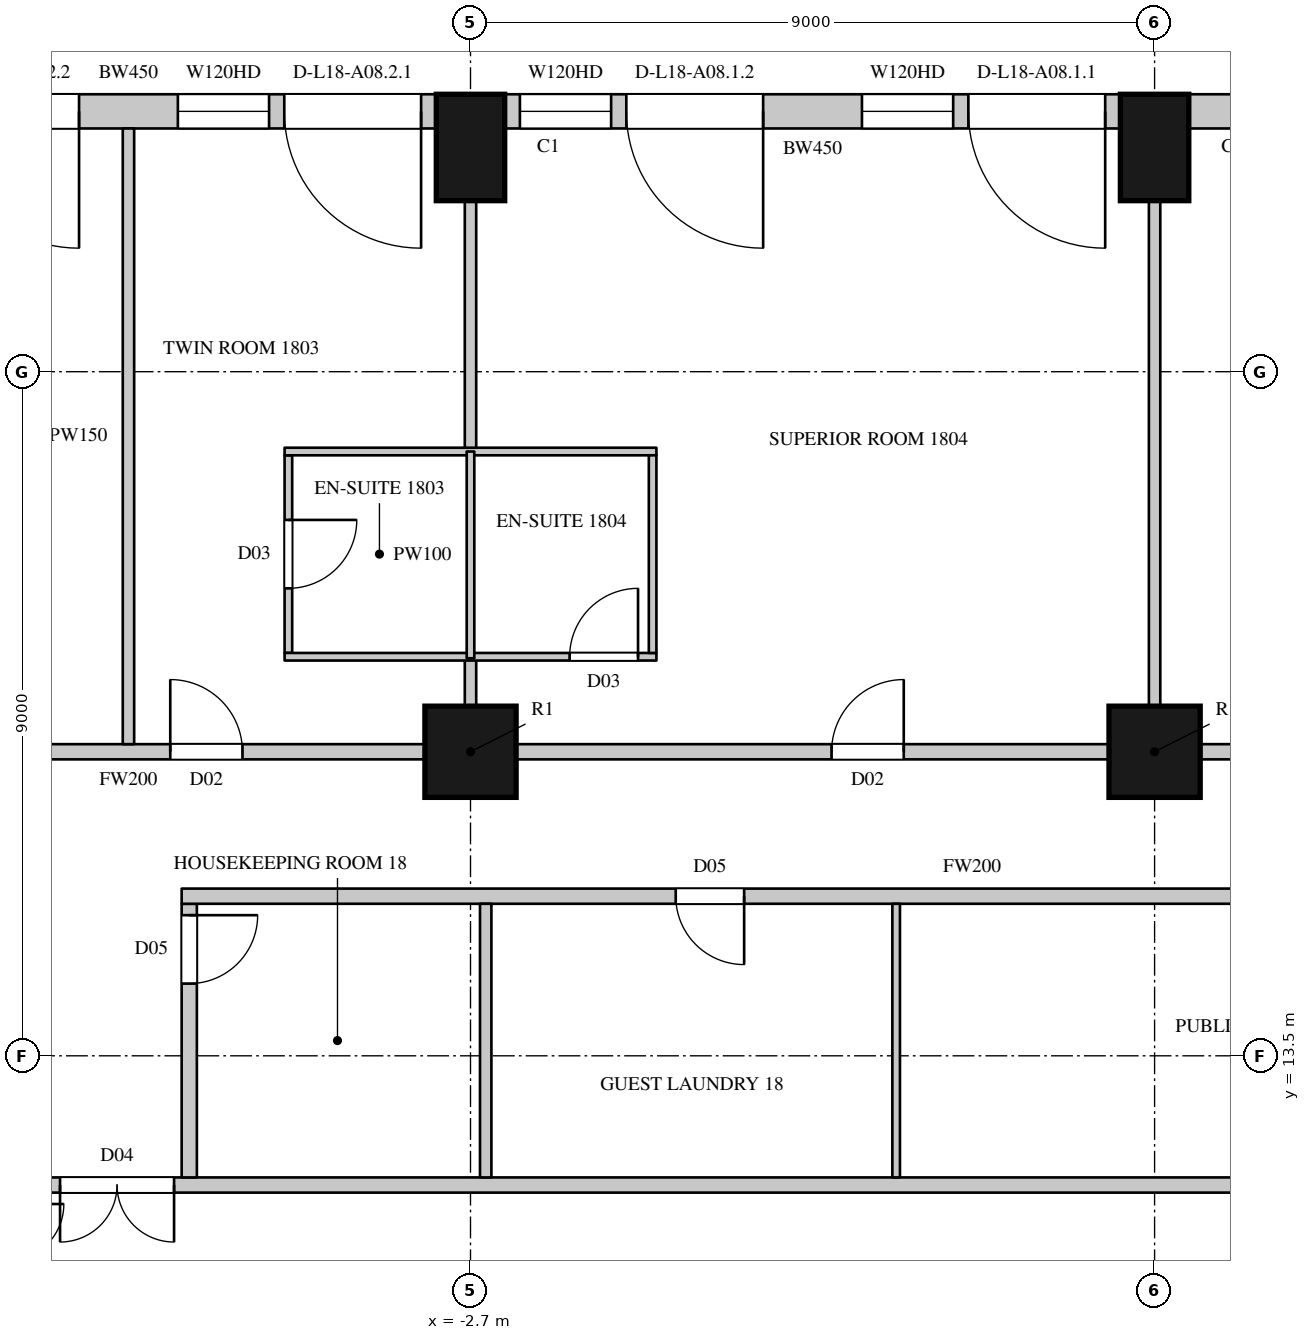
"""IFC4 building model, lengths in metres.
Left out: names, types, materials, properties, quantities, classifications, styles, units other than length and angle.
Written with IfcOpenShell. Run it as: python <this file> out.ifc"""

import sys

from ifc_helpers import new_model, si_unit, direction, frame, frame_2d, origin, origin_2d, place, context, subcontext, project, spatial, rectangle, circle, extrude, element, fill, save


model = new_model("IFC4")
c1 = context("Model", 3, precision=1e-05, world=origin(), true_north=direction((0.0, 1.0)))
c2 = subcontext(c1, "Body", "Model", "MODEL_VIEW")
j1 = project(units=[si_unit("LENGTHUNIT", "METRE"), si_unit("PLANEANGLEUNIT", "RADIAN")], contexts=[c1])
p1 = place(None, origin())
s1 = spatial("IfcSite", under=j1, at=p1, CompositionType="ELEMENT")
p2 = place(p1, origin())
s2 = spatial("IfcBuilding", under=s1, at=p2, CompositionType="ELEMENT")
p3 = place(p2, frame((0.0, 0.0, 95.1)))
s3 = spatial("IfcBuildingStorey", under=s2, at=p3, CompositionType="ELEMENT", Elevation=95.1)
for number, where, z_axis, x_axis in (
    (1, (6.3, 25.45, 0.0), (0.0, 0.0, 1.0), (-1.0, 0.0, 0.0)),
    (2, (-2.7, 25.45, 0.0), (0.0, 0.0, 1.0), (-1.0, 0.0, 0.0)),
):
    element("IfcColumn", number, at=place(p3, frame(where, z_axis=z_axis, x_axis=x_axis)), inside=s3, PredefinedType="COLUMN", context=c2, shape_type="SweptSolid", body=[
        extrude(rectangle(XDim=0.9, YDim=1.4, at=origin_2d()), origin(), (0.0, 0.0, 1.0), 3.6),
    ])
for number, where, z_axis, x_axis in (
    (3, (-2.7, 17.5, 0.0), (0.0, 0.0, 1.0), (1.0, 0.0, 0.0)),
    (4, (6.3, 17.5, 0.0), (0.0, 0.0, 1.0), (1.0, 0.0, 0.0)),
):
    element("IfcColumn", number, at=place(p3, frame(where, z_axis=z_axis, x_axis=x_axis)), inside=s3, PredefinedType="COLUMN", context=c2, shape_type="SweptSolid", body=[
        extrude(circle(Radius=0.6, at=origin_2d()), origin(), (0.0, 0.0, 1.0), 3.6),
    ])
p4 = place(p3, frame((11.989, 25.925, 0.0), z_axis=(0.0, 0.0, 1.0), x_axis=(-1.0, 0.0, 0.0)))
e5 = element("IfcWall", 5, at=p4, inside=s3, PredefinedType="SOLIDWALL", context=c2, shape_type="SweptSolid", body=[
    extrude(rectangle(XDim=5.239, YDim=0.45, at=frame_2d((2.619, 0.0))), origin(), (0.0, 0.0, 1.0), 3.3),
])
p5 = place(p4, frame((1.77, 0.0, 1.05)))
e6 = element("IfcOpeningElement", 6, at=p5, cuts=e5, PredefinedType="OPENING", context=c2, shape_type="SweptSolid", body=[
    extrude(rectangle(XDim=2.1, YDim=2.0, at=frame_2d((1.05, 1.0))), frame((0.0, 0.235, 0.0), z_axis=(0.0, -1.0, 0.0), x_axis=(1.0, 0.0, 0.0)), (0.0, 0.0, 1.0), 0.47),
])
p6 = place(p3, frame((5.85, 25.925, 0.0), z_axis=(0.0, 0.0, 1.0), x_axis=(-1.0, 0.0, 0.0)))
e7 = element("IfcWall", 7, at=p6, inside=s3, PredefinedType="SOLIDWALL", context=c2, shape_type="SweptSolid", body=[
    extrude(rectangle(XDim=8.1, YDim=0.45, at=frame_2d((4.05, 0.0))), origin(), (0.0, 0.0, 1.0), 3.3),
])
p7 = place(p6, frame((0.2, 0.0, 0.0)))
e8 = element("IfcOpeningElement", 8, at=p7, cuts=e7, PredefinedType="OPENING", context=c2, shape_type="SweptSolid", body=[
    extrude(rectangle(XDim=1.8, YDim=2.4, at=frame_2d((0.9, 1.2))), frame((0.0, 0.235, 0.0), z_axis=(0.0, -1.0, 0.0), x_axis=(1.0, 0.0, 0.0)), (0.0, 0.0, 1.0), 0.47),
])
p8 = place(p6, frame((2.2, 0.0, 1.05)))
e9 = element("IfcOpeningElement", 9, at=p8, cuts=e7, PredefinedType="OPENING", context=c2, shape_type="SweptSolid", body=[
    extrude(rectangle(XDim=1.2, YDim=2.0, at=frame_2d((0.6, 1.0))), frame((0.0, 0.235, 0.0), z_axis=(0.0, -1.0, 0.0), x_axis=(1.0, 0.0, 0.0)), (0.0, 0.0, 1.0), 0.47),
])
p9 = place(p6, frame((4.7, 0.0, 0.0)))
e10 = element("IfcOpeningElement", 10, at=p9, cuts=e7, PredefinedType="OPENING", context=c2, shape_type="SweptSolid", body=[
    extrude(rectangle(XDim=1.8, YDim=2.4, at=frame_2d((0.9, 1.2))), frame((0.0, 0.235, 0.0), z_axis=(0.0, -1.0, 0.0), x_axis=(1.0, 0.0, 0.0)), (0.0, 0.0, 1.0), 0.47),
])
p10 = place(p6, frame((6.7, 0.0, 1.05)))
e11 = element("IfcOpeningElement", 11, at=p10, cuts=e7, PredefinedType="OPENING", context=c2, shape_type="SweptSolid", body=[
    extrude(rectangle(XDim=1.2, YDim=2.0, at=frame_2d((0.6, 1.0))), frame((0.0, 0.235, 0.0), z_axis=(0.0, -1.0, 0.0), x_axis=(1.0, 0.0, 0.0)), (0.0, 0.0, 1.0), 0.47),
])
p11 = place(p3, frame((-3.15, 25.925, 0.0), z_axis=(0.0, 0.0, 1.0), x_axis=(-1.0, 0.0, 0.0)))
e12 = element("IfcWall", 12, at=p11, inside=s3, PredefinedType="SOLIDWALL", context=c2, shape_type="SweptSolid", body=[
    extrude(rectangle(XDim=8.1, YDim=0.45, at=frame_2d((4.05, 0.0))), origin(), (0.0, 0.0, 1.0), 3.3),
])
p12 = place(p11, frame((0.2, 0.0, 0.0)))
e13 = element("IfcOpeningElement", 13, at=p12, cuts=e12, PredefinedType="OPENING", context=c2, shape_type="SweptSolid", body=[
    extrude(rectangle(XDim=1.8, YDim=2.4, at=frame_2d((0.9, 1.2))), frame((0.0, 0.235, 0.0), z_axis=(0.0, -1.0, 0.0), x_axis=(1.0, 0.0, 0.0)), (0.0, 0.0, 1.0), 0.47),
])
p13 = place(p11, frame((2.2, 0.0, 1.05)))
e14 = element("IfcOpeningElement", 14, at=p13, cuts=e12, PredefinedType="OPENING", context=c2, shape_type="SweptSolid", body=[
    extrude(rectangle(XDim=1.2, YDim=2.0, at=frame_2d((0.6, 1.0))), frame((0.0, 0.235, 0.0), z_axis=(0.0, -1.0, 0.0), x_axis=(1.0, 0.0, 0.0)), (0.0, 0.0, 1.0), 0.47),
])
p14 = place(p11, frame((4.7, 0.0, 0.0)))
e15 = element("IfcOpeningElement", 15, at=p14, cuts=e12, PredefinedType="OPENING", context=c2, shape_type="SweptSolid", body=[
    extrude(rectangle(XDim=1.8, YDim=2.4, at=frame_2d((0.9, 1.2))), frame((0.0, 0.235, 0.0), z_axis=(0.0, -1.0, 0.0), x_axis=(1.0, 0.0, 0.0)), (0.0, 0.0, 1.0), 0.47),
])
p15 = place(p11, frame((6.7, 0.0, 1.05)))
e16 = element("IfcOpeningElement", 16, at=p15, cuts=e12, PredefinedType="OPENING", context=c2, shape_type="SweptSolid", body=[
    extrude(rectangle(XDim=1.2, YDim=2.0, at=frame_2d((0.6, 1.0))), frame((0.0, 0.235, 0.0), z_axis=(0.0, -1.0, 0.0), x_axis=(1.0, 0.0, 0.0)), (0.0, 0.0, 1.0), 0.47),
])
p16 = place(p3, frame((-11.1, 17.5, 0.0), z_axis=(0.0, 0.0, 1.0), x_axis=(1.0, 0.0, 0.0)))
e17 = element("IfcWall", 17, at=p16, inside=s3, PredefinedType="PARTITIONING", context=c2, shape_type="SweptSolid", body=[
    extrude(rectangle(XDim=7.8, YDim=0.2, at=frame_2d((3.9, 0.0))), origin(), (0.0, 0.0, 1.0), 2.75),
])
p17 = place(p16, frame((4.45, 0.0, 0.0)))
e18 = element("IfcOpeningElement", 18, at=p17, cuts=e17, PredefinedType="OPENING", context=c2, shape_type="SweptSolid", body=[
    extrude(rectangle(XDim=0.95, YDim=2.2, at=frame_2d((0.475, 1.1))), frame((0.0, 0.11, 0.0), z_axis=(0.0, -1.0, 0.0), x_axis=(1.0, 0.0, 0.0)), (0.0, 0.0, 1.0), 0.22),
])
p18 = place(p3, frame((-2.1, 17.5, 0.0), z_axis=(0.0, 0.0, 1.0), x_axis=(1.0, 0.0, 0.0)))
e19 = element("IfcWall", 19, at=p18, inside=s3, PredefinedType="PARTITIONING", context=c2, shape_type="SweptSolid", body=[
    extrude(rectangle(XDim=7.8, YDim=0.2, at=frame_2d((3.9, 0.0))), origin(), (0.0, 0.0, 1.0), 2.75),
])
p19 = place(p18, frame((4.15, 0.0, 0.0)))
e20 = element("IfcOpeningElement", 20, at=p19, cuts=e19, PredefinedType="OPENING", context=c2, shape_type="SweptSolid", body=[
    extrude(rectangle(XDim=0.95, YDim=2.2, at=frame_2d((0.475, 1.1))), frame((0.0, 0.11, 0.0), z_axis=(0.0, -1.0, 0.0), x_axis=(1.0, 0.0, 0.0)), (0.0, 0.0, 1.0), 0.22),
])
p20 = place(p3, frame((6.9, 17.5, 0.0), z_axis=(0.0, 0.0, 1.0), x_axis=(1.0, 0.0, 0.0)))
e21 = element("IfcWall", 21, at=p20, inside=s3, PredefinedType="PARTITIONING", context=c2, shape_type="SweptSolid", body=[
    extrude(rectangle(XDim=7.8, YDim=0.2, at=frame_2d((3.9, 0.0))), origin(), (0.0, 0.0, 1.0), 2.75),
])
p21 = place(p20, frame((1.45, 0.0, 0.0)))
e22 = element("IfcOpeningElement", 22, at=p21, cuts=e21, PredefinedType="OPENING", context=c2, shape_type="SweptSolid", body=[
    extrude(rectangle(XDim=1.1, YDim=2.4, at=frame_2d((0.55, 1.2))), frame((0.0, 0.11, 0.0), z_axis=(0.0, -1.0, 0.0), x_axis=(1.0, 0.0, 0.0)), (0.0, 0.0, 1.0), 0.22),
])
p22 = place(p3, frame((-8.9, 11.8, 0.0), z_axis=(0.0, 0.0, 1.0), x_axis=(1.0, 0.0, 0.0)))
e23 = element("IfcWall", 23, at=p22, inside=s3, PredefinedType="PARTITIONING", context=c2, shape_type="SweptSolid", body=[
    extrude(rectangle(XDim=19.7, YDim=0.2, at=frame_2d((9.85, 0.0))), origin(), (0.0, 0.0, 1.0), 3.3),
])
p23 = place(p22, frame((0.8, 0.0, 0.0)))
e24 = element("IfcOpeningElement", 24, at=p23, cuts=e23, PredefinedType="OPENING", context=c2, shape_type="SweptSolid", body=[
    extrude(rectangle(XDim=1.5, YDim=2.2, at=frame_2d((0.75, 1.1))), frame((0.0, 0.11, 0.0), z_axis=(0.0, -1.0, 0.0), x_axis=(1.0, 0.0, 0.0)), (0.0, 0.0, 1.0), 0.22),
])
p24 = place(p3, frame((-6.4, 11.9, 0.0), z_axis=(0.0, 0.0, 1.0), x_axis=(0.0, 1.0, 0.0)))
e25 = element("IfcWall", 25, at=p24, inside=s3, PredefinedType="PARTITIONING", context=c2, shape_type="SweptSolid", body=[
    extrude(rectangle(XDim=3.6, YDim=0.2, at=frame_2d((1.8, 0.0))), origin(), (0.0, 0.0, 1.0), 3.3),
])
p25 = place(p24, frame((2.55, 0.0, 0.0)))
e26 = element("IfcOpeningElement", 26, at=p25, cuts=e25, PredefinedType="OPENING", context=c2, shape_type="SweptSolid", body=[
    extrude(rectangle(XDim=0.9, YDim=2.2, at=frame_2d((0.45, 1.1))), frame((0.0, 0.11, 0.0), z_axis=(0.0, -1.0, 0.0), x_axis=(1.0, 0.0, 0.0)), (0.0, 0.0, 1.0), 0.22),
])
p26 = place(p3, frame((-6.5, 15.6, 0.0), z_axis=(0.0, 0.0, 1.0), x_axis=(1.0, 0.0, 0.0)))
e27 = element("IfcWall", 27, at=p26, inside=s3, PredefinedType="PARTITIONING", context=c2, shape_type="SweptSolid", body=[
    extrude(rectangle(XDim=20.8, YDim=0.2, at=frame_2d((10.4, 0.0))), origin(), (0.0, 0.0, 1.0), 3.3),
])
p27 = place(p26, frame((6.5, 0.0, 0.0)))
e28 = element("IfcOpeningElement", 28, at=p27, cuts=e27, PredefinedType="OPENING", context=c2, shape_type="SweptSolid", body=[
    extrude(rectangle(XDim=0.9, YDim=2.2, at=frame_2d((0.45, 1.1))), frame((0.0, 0.11, 0.0), z_axis=(0.0, -1.0, 0.0), x_axis=(1.0, 0.0, 0.0)), (0.0, 0.0, 1.0), 0.22),
])
p28 = place(p26, frame((16.65, 0.0, 0.0)))
e29 = element("IfcOpeningElement", 29, at=p28, cuts=e27, PredefinedType="OPENING", context=c2, shape_type="SweptSolid", body=[
    extrude(rectangle(XDim=0.9, YDim=2.2, at=frame_2d((0.45, 1.1))), frame((0.0, 0.11, 0.0), z_axis=(0.0, -1.0, 0.0), x_axis=(1.0, 0.0, 0.0)), (0.0, 0.0, 1.0), 0.22),
])
p29 = place(p3, frame((-7.2, 17.6, 0.0), z_axis=(0.0, 0.0, 1.0), x_axis=(0.0, 1.0, 0.0)))
e30 = element("IfcWall", 30, at=p29, inside=s3, PredefinedType="PARTITIONING", context=c2, shape_type="SweptSolid", body=[
    extrude(rectangle(XDim=8.1, YDim=0.15, at=frame_2d((4.05, 0.0))), origin(), (0.0, 0.0, 1.0), 2.65),
])
p30 = place(p3, frame((-2.7, 18.1, 0.0), z_axis=(0.0, 0.0, 1.0), x_axis=(0.0, 1.0, 0.0)))
e31 = element("IfcWall", 31, at=p30, inside=s3, PredefinedType="PARTITIONING", context=c2, shape_type="SweptSolid", body=[
    extrude(rectangle(XDim=0.63, YDim=0.15, at=frame_2d((0.315, 0.0))), origin(), (0.0, 0.0, 1.0), 2.75),
])
p31 = place(p3, frame((-2.7, 21.45, 0.0), z_axis=(0.0, 0.0, 1.0), x_axis=(0.0, 1.0, 0.0)))
e32 = element("IfcWall", 32, at=p31, inside=s3, PredefinedType="PARTITIONING", context=c2, shape_type="SweptSolid", body=[
    extrude(rectangle(XDim=3.3, YDim=0.15, at=frame_2d((1.65, 0.0))), origin(), (0.0, 0.0, 1.0), 2.75),
])
p32 = place(p3, frame((-2.5, 11.9, 0.0), z_axis=(0.0, 0.0, 1.0), x_axis=(0.0, 1.0, 0.0)))
e33 = element("IfcWall", 33, at=p32, inside=s3, PredefinedType="PARTITIONING", context=c2, shape_type="SweptSolid", body=[
    extrude(rectangle(XDim=3.6, YDim=0.15, at=frame_2d((1.8, 0.0))), origin(), (0.0, 0.0, 1.0), 2.75),
])
p33 = place(p3, frame((6.3, 18.1, 0.0), z_axis=(0.0, 0.0, 1.0), x_axis=(0.0, 1.0, 0.0)))
e34 = element("IfcWall", 34, at=p33, inside=s3, PredefinedType="PARTITIONING", context=c2, shape_type="SweptSolid", body=[
    extrude(rectangle(XDim=6.65, YDim=0.15, at=frame_2d((3.325, 0.0))), origin(), (0.0, 0.0, 1.0), 2.75),
])
p34 = place(p3, frame((-5.096, 18.8, 0.0), z_axis=(0.0, 0.0, 1.0), x_axis=(0.0, 1.0, 0.0)))
e35 = element("IfcWall", 35, at=p34, inside=s3, PredefinedType="PARTITIONING", context=c2, shape_type="SweptSolid", body=[
    extrude(rectangle(XDim=2.6, YDim=0.1, at=frame_2d((1.3, 0.0))), origin(), (0.0, 0.0, 1.0), 3.3),
])
p35 = place(p34, frame((0.85, 0.0, 0.0)))
e36 = element("IfcOpeningElement", 36, at=p35, cuts=e35, PredefinedType="OPENING", context=c2, shape_type="SweptSolid", body=[
    extrude(rectangle(XDim=0.9, YDim=2.2, at=frame_2d((0.45, 1.1))), frame((0.0, 0.06, 0.0), z_axis=(0.0, -1.0, 0.0), x_axis=(1.0, 0.0, 0.0)), (0.0, 0.0, 1.0), 0.12),
])
p36 = place(p3, frame((-5.146, 18.75, 0.0), z_axis=(0.0, 0.0, 1.0), x_axis=(1.0, 0.0, 0.0)))
e37 = element("IfcWall", 37, at=p36, inside=s3, PredefinedType="PARTITIONING", context=c2, shape_type="SweptSolid", body=[
    extrude(rectangle(XDim=4.892, YDim=0.1, at=frame_2d((2.446, 0.0))), origin(), (0.0, 0.0, 1.0), 3.3),
])
p37 = place(p36, frame((3.75, 0.0, 0.0)))
e38 = element("IfcOpeningElement", 38, at=p37, cuts=e37, PredefinedType="OPENING", context=c2, shape_type="SweptSolid", body=[
    extrude(rectangle(XDim=0.9, YDim=2.2, at=frame_2d((0.45, 1.1))), frame((0.0, 0.06, 0.0), z_axis=(0.0, -1.0, 0.0), x_axis=(1.0, 0.0, 0.0)), (0.0, 0.0, 1.0), 0.12),
])
p38 = place(p3, frame((-5.146, 21.45, 0.0), z_axis=(0.0, 0.0, 1.0), x_axis=(1.0, 0.0, 0.0)))
e39 = element("IfcWall", 39, at=p38, inside=s3, PredefinedType="PARTITIONING", context=c2, shape_type="SweptSolid", body=[
    extrude(rectangle(XDim=4.892, YDim=0.1, at=frame_2d((2.446, 0.0))), origin(), (0.0, 0.0, 1.0), 3.3),
])
p39 = place(p3, frame((-2.7, 18.73, 0.0), z_axis=(0.0, 0.0, 1.0), x_axis=(0.0, 1.0, 0.0)))
e40 = element("IfcWall", 40, at=p39, inside=s3, PredefinedType="PARTITIONING", context=c2, shape_type="SweptSolid", body=[
    extrude(rectangle(XDim=2.72, YDim=0.1, at=frame_2d((1.36, 0.0))), origin(), (0.0, 0.0, 1.0), 2.75),
])
p40 = place(p3, frame((-0.304, 18.8, 0.0), z_axis=(0.0, 0.0, 1.0), x_axis=(0.0, 1.0, 0.0)))
e41 = element("IfcWall", 41, at=p40, inside=s3, PredefinedType="PARTITIONING", context=c2, shape_type="SweptSolid", body=[
    extrude(rectangle(XDim=2.6, YDim=0.1, at=frame_2d((1.3, 0.0))), origin(), (0.0, 0.0, 1.0), 3.3),
])
p41 = place(p3, frame((2.9, 11.9, 0.0), z_axis=(0.0, 0.0, 1.0), x_axis=(0.0, 1.0, 0.0)))
e42 = element("IfcWall", 42, at=p41, inside=s3, PredefinedType="PARTITIONING", context=c2, shape_type="SweptSolid", body=[
    extrude(rectangle(XDim=3.6, YDim=0.1, at=frame_2d((1.8, 0.0))), origin(), (0.0, 0.0, 1.0), 3.3),
])
p42 = place(p7, origin())
e43 = element("IfcDoor", 43, at=p42, inside=s3, OperationType="SLIDING_TO_LEFT", PredefinedType="DOOR", context=c2, shape_type="SweptSolid", body=[
    extrude(rectangle(XDim=1.8, YDim=2.4, at=frame_2d((0.9, 1.2))), frame((0.0, 0.13, 0.0), z_axis=(0.0, -1.0, 0.0), x_axis=(1.0, 0.0, 0.0)), (0.0, 0.0, 1.0), 0.05),
])
fill(e8, e43)
p43 = place(p8, origin())
e44 = element("IfcWindow", 44, at=p43, inside=s3, PartitioningType="SINGLE_PANEL", PredefinedType="WINDOW", context=c2, shape_type="SweptSolid", body=[
    extrude(rectangle(XDim=1.2, YDim=2.0, at=frame_2d((0.6, 1.0))), frame((0.0, 0.135, 0.0), z_axis=(0.0, -1.0, 0.0), x_axis=(1.0, 0.0, 0.0)), (0.0, 0.0, 1.0), 0.06),
])
fill(e9, e44)
p44 = place(p9, origin())
e45 = element("IfcDoor", 45, at=p44, inside=s3, OperationType="SLIDING_TO_LEFT", PredefinedType="DOOR", context=c2, shape_type="SweptSolid", body=[
    extrude(rectangle(XDim=1.8, YDim=2.4, at=frame_2d((0.9, 1.2))), frame((0.0, 0.13, 0.0), z_axis=(0.0, -1.0, 0.0), x_axis=(1.0, 0.0, 0.0)), (0.0, 0.0, 1.0), 0.05),
])
fill(e10, e45)
p45 = place(p10, origin())
e46 = element("IfcWindow", 46, at=p45, inside=s3, PartitioningType="SINGLE_PANEL", PredefinedType="WINDOW", context=c2, shape_type="SweptSolid", body=[
    extrude(rectangle(XDim=1.2, YDim=2.0, at=frame_2d((0.6, 1.0))), frame((0.0, 0.135, 0.0), z_axis=(0.0, -1.0, 0.0), x_axis=(1.0, 0.0, 0.0)), (0.0, 0.0, 1.0), 0.06),
])
fill(e11, e46)
p46 = place(p12, origin())
e47 = element("IfcDoor", 47, at=p46, inside=s3, OperationType="SLIDING_TO_LEFT", PredefinedType="DOOR", context=c2, shape_type="SweptSolid", body=[
    extrude(rectangle(XDim=1.8, YDim=2.4, at=frame_2d((0.9, 1.2))), frame((0.0, 0.13, 0.0), z_axis=(0.0, -1.0, 0.0), x_axis=(1.0, 0.0, 0.0)), (0.0, 0.0, 1.0), 0.05),
])
fill(e13, e47)
p47 = place(p13, origin())
e48 = element("IfcWindow", 48, at=p47, inside=s3, PartitioningType="SINGLE_PANEL", PredefinedType="WINDOW", context=c2, shape_type="SweptSolid", body=[
    extrude(rectangle(XDim=1.2, YDim=2.0, at=frame_2d((0.6, 1.0))), frame((0.0, 0.135, 0.0), z_axis=(0.0, -1.0, 0.0), x_axis=(1.0, 0.0, 0.0)), (0.0, 0.0, 1.0), 0.06),
])
fill(e14, e48)
p48 = place(p14, origin())
e49 = element("IfcDoor", 49, at=p48, inside=s3, OperationType="SLIDING_TO_LEFT", PredefinedType="DOOR", context=c2, shape_type="SweptSolid", body=[
    extrude(rectangle(XDim=1.8, YDim=2.4, at=frame_2d((0.9, 1.2))), frame((0.0, 0.13, 0.0), z_axis=(0.0, -1.0, 0.0), x_axis=(1.0, 0.0, 0.0)), (0.0, 0.0, 1.0), 0.05),
])
fill(e15, e49)
p49 = place(p23, origin())
e50 = element("IfcDoor", 50, at=p49, inside=s3, OperationType="DOUBLE_DOOR_SINGLE_SWING", PredefinedType="DOOR", context=c2, shape_type="SweptSolid", body=[
    extrude(rectangle(XDim=1.5, YDim=2.2, at=frame_2d((0.75, 1.1))), frame((0.0, 0.025, 0.0), z_axis=(0.0, -1.0, 0.0), x_axis=(1.0, 0.0, 0.0)), (0.0, 0.0, 1.0), 0.05),
])
fill(e24, e50)
p50 = place(p25, origin())
e51 = element("IfcDoor", 51, at=p50, inside=s3, OperationType="SINGLE_SWING_LEFT", PredefinedType="DOOR", context=c2, shape_type="SweptSolid", body=[
    extrude(rectangle(XDim=0.9, YDim=2.2, at=frame_2d((0.45, 1.1))), frame((0.0, 0.025, 0.0), z_axis=(0.0, -1.0, 0.0), x_axis=(1.0, 0.0, 0.0)), (0.0, 0.0, 1.0), 0.05),
])
fill(e26, e51)
p51 = place(p27, origin())
e52 = element("IfcDoor", 52, at=p51, inside=s3, OperationType="SINGLE_SWING_LEFT", PredefinedType="DOOR", context=c2, shape_type="SweptSolid", body=[
    extrude(rectangle(XDim=0.9, YDim=2.2, at=frame_2d((0.45, 1.1))), frame((0.0, 0.025, 0.0), z_axis=(0.0, -1.0, 0.0), x_axis=(1.0, 0.0, 0.0)), (0.0, 0.0, 1.0), 0.05),
])
fill(e28, e52)
p52 = place(p17, origin())
e53 = element("IfcDoor", 53, at=p52, inside=s3, OperationType="SINGLE_SWING_LEFT", PredefinedType="DOOR", context=c2, shape_type="SweptSolid", body=[
    extrude(rectangle(XDim=0.95, YDim=2.2, at=frame_2d((0.475, 1.1))), frame((0.0, 0.025, 0.0), z_axis=(0.0, -1.0, 0.0), x_axis=(1.0, 0.0, 0.0)), (0.0, 0.0, 1.0), 0.05),
])
fill(e18, e53)
p53 = place(p35, origin())
e54 = element("IfcDoor", 54, at=p53, inside=s3, OperationType="SINGLE_SWING_LEFT", PredefinedType="DOOR", context=c2, shape_type="SweptSolid", body=[
    extrude(rectangle(XDim=0.9, YDim=2.2, at=frame_2d((0.45, 1.1))), frame((0.0, 0.025, 0.0), z_axis=(0.0, -1.0, 0.0), x_axis=(1.0, 0.0, 0.0)), (0.0, 0.0, 1.0), 0.05),
])
fill(e36, e54)
p54 = place(p19, origin())
e55 = element("IfcDoor", 55, at=p54, inside=s3, OperationType="SINGLE_SWING_RIGHT", PredefinedType="DOOR", context=c2, shape_type="SweptSolid", body=[
    extrude(rectangle(XDim=0.95, YDim=2.2, at=frame_2d((0.475, 1.1))), frame((0.0, 0.025, 0.0), z_axis=(0.0, -1.0, 0.0), x_axis=(1.0, 0.0, 0.0)), (0.0, 0.0, 1.0), 0.05),
])
fill(e20, e55)
p55 = place(p37, origin())
e56 = element("IfcDoor", 56, at=p55, inside=s3, OperationType="SINGLE_SWING_RIGHT", PredefinedType="DOOR", context=c2, shape_type="SweptSolid", body=[
    extrude(rectangle(XDim=0.9, YDim=2.2, at=frame_2d((0.45, 1.1))), frame((0.0, 0.025, 0.0), z_axis=(0.0, -1.0, 0.0), x_axis=(1.0, 0.0, 0.0)), (0.0, 0.0, 1.0), 0.05),
])
fill(e38, e56)
save(model, sys.argv[1])
